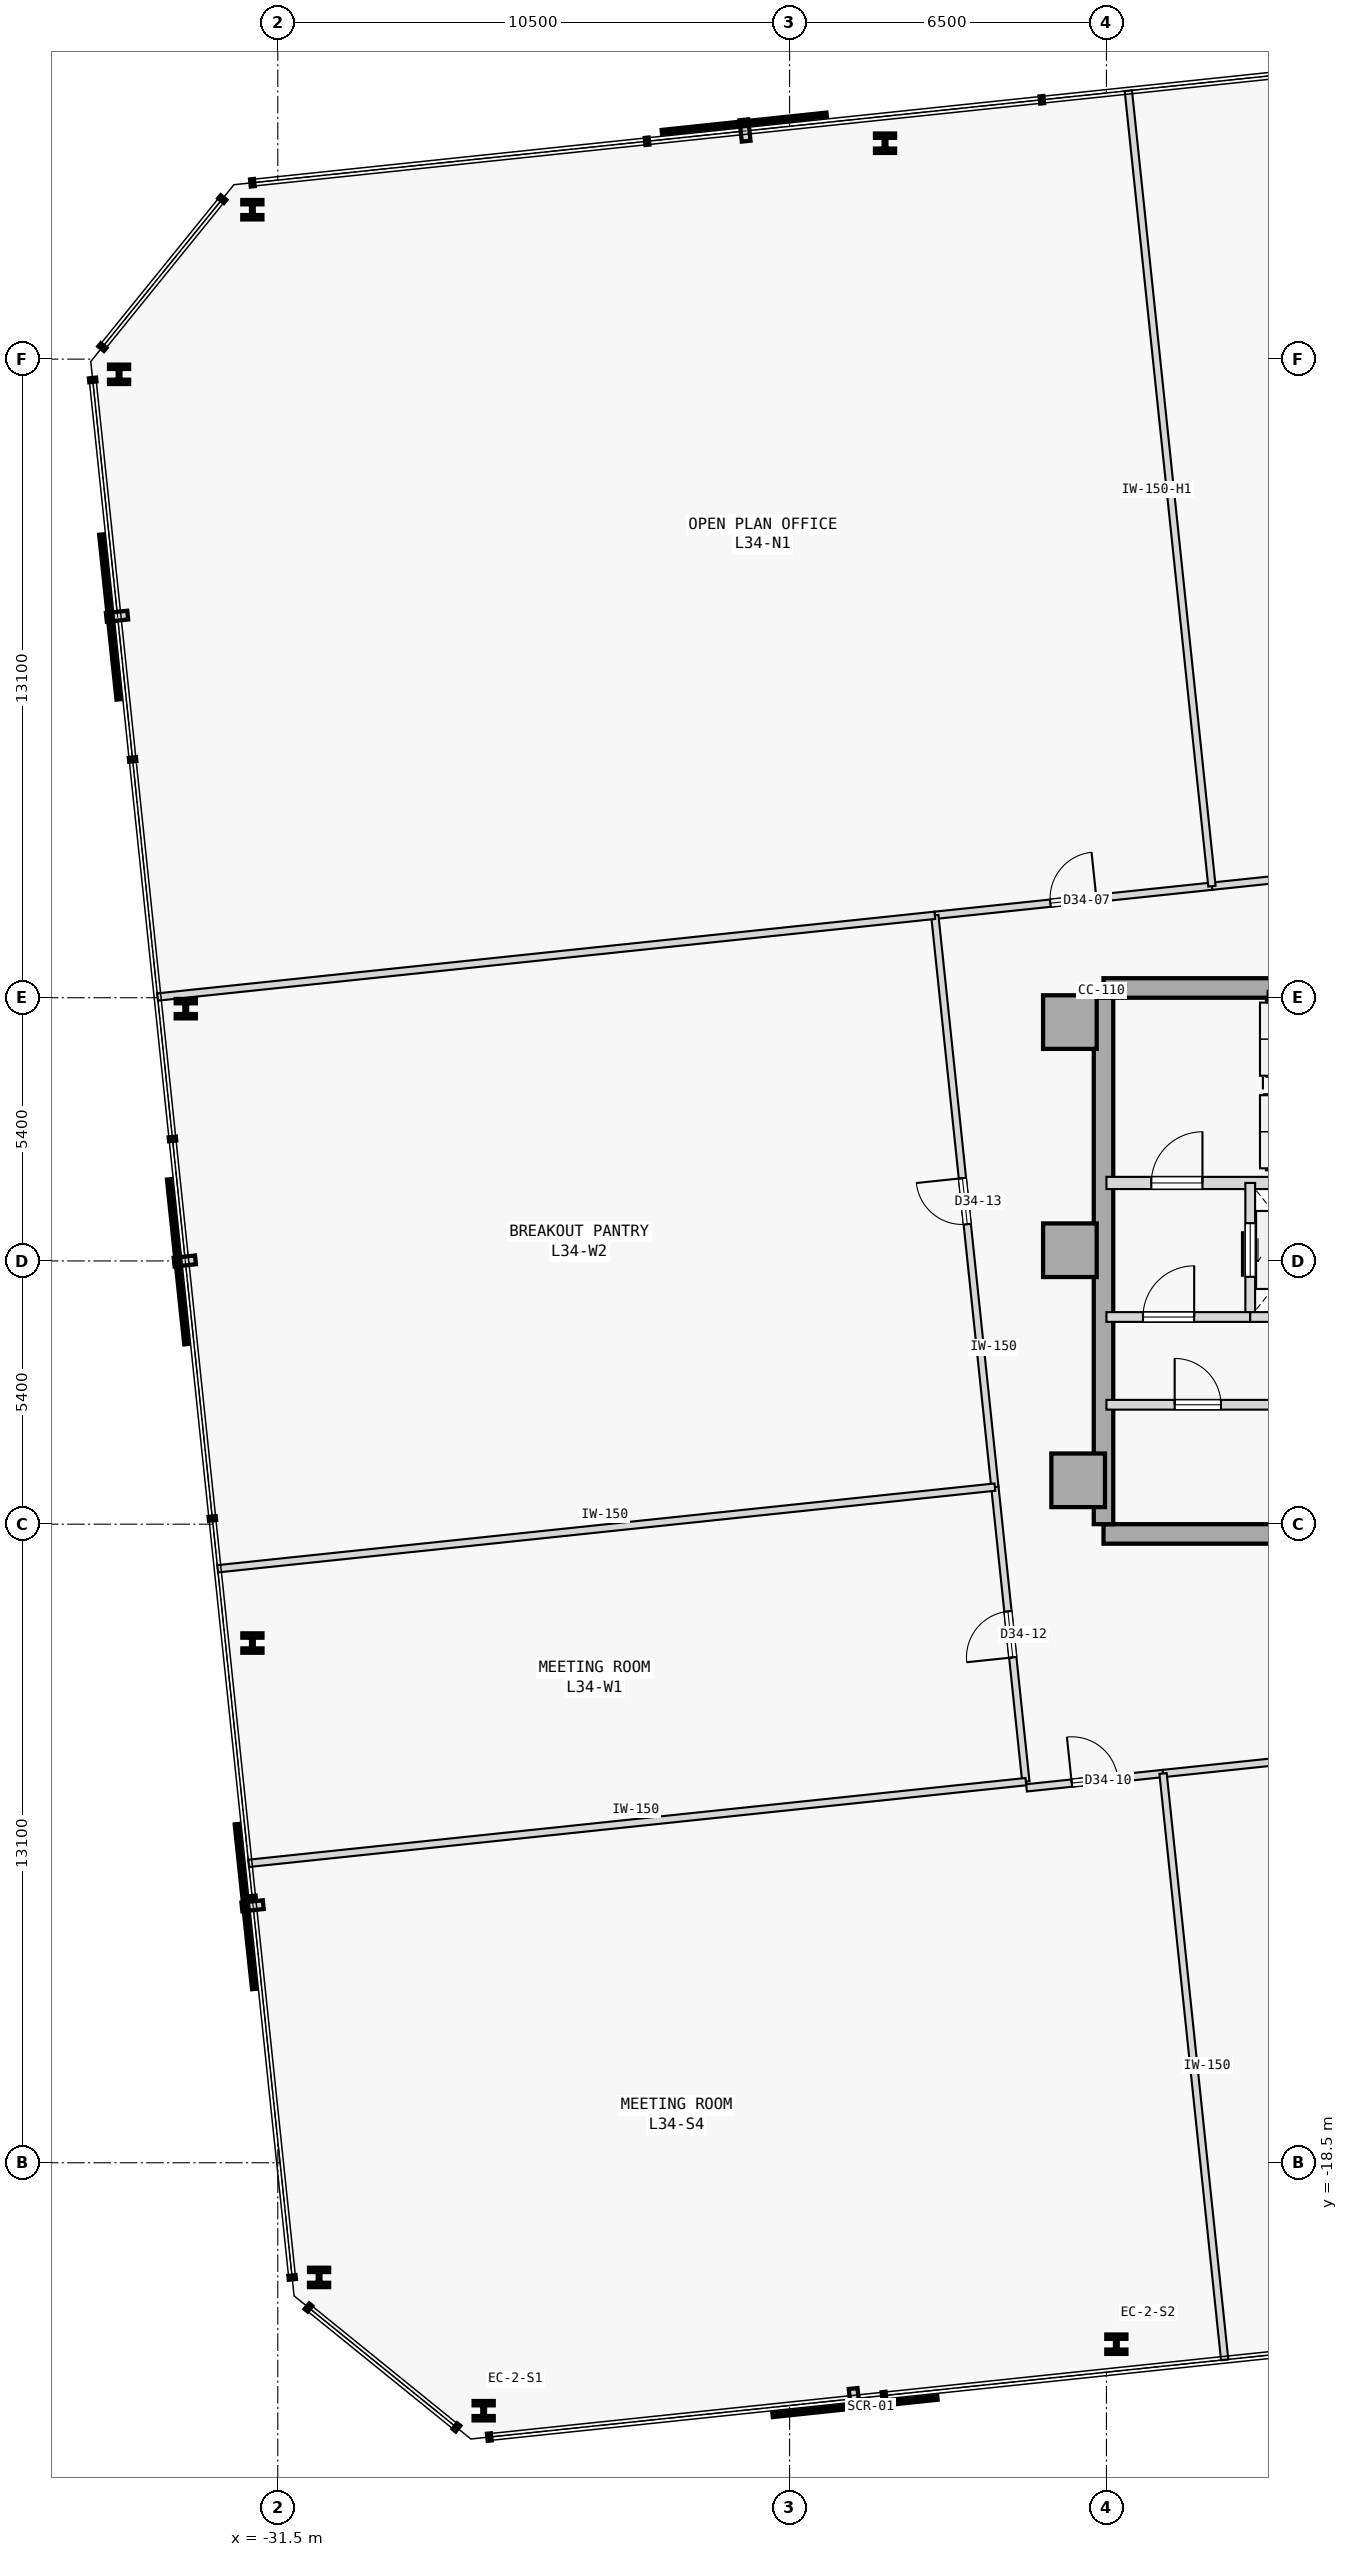
"""IFC4 building model, lengths in metres.
Left out: names, types, materials, properties, quantities, classifications, styles, units other than length and angle.
Written with IfcOpenShell. Run it as: python <this file> out.ifc"""

import sys

from ifc_helpers import new_model, si_unit, direction, frame, frame_2d, origin, origin_2d, place, context, subcontext, project, spatial, rectangle, i_section, extrude, element, fill, save


model = new_model("IFC4")
c1 = context("Model", 3, precision=1e-05, world=origin(), true_north=direction((0.0, 1.0)))
c2 = subcontext(c1, "Body", "Model", "MODEL_VIEW")
j1 = project(units=[si_unit("LENGTHUNIT", "METRE"), si_unit("PLANEANGLEUNIT", "RADIAN")], contexts=[c1])
p1 = place(None, origin())
s1 = spatial("IfcSite", under=j1, at=p1, CompositionType="ELEMENT")
p2 = place(p1, origin())
s2 = spatial("IfcBuilding", under=s1, at=p2, CompositionType="ELEMENT")
p3 = place(p2, frame((0.0, 0.0, 135.5)))
s3 = spatial("IfcBuildingStorey", under=s2, at=p3, CompositionType="ELEMENT", Elevation=135.5)
for number, where, z_axis, x_axis in (
    (1, (-15.25, 4.9, 0.0), (0.0, 0.0, 1.0), (1.0, 0.0, 0.0)),
    (2, (-15.25, 0.22, 0.0), (0.0, 0.0, 1.0), (1.0, 0.0, 0.0)),
    (3, (-15.08, -4.5, 0.0), (0.0, 0.0, 1.0), (1.0, 0.0, 0.0)),
):
    element("IfcColumn", number, at=place(p3, frame(where, z_axis=z_axis, x_axis=x_axis)), inside=s3, PredefinedType="COLUMN", context=c2, shape_type="SweptSolid", body=[
        extrude(rectangle(XDim=1.1, YDim=1.1, at=origin_2d()), origin(), (0.0, 0.0, 1.0), 3.7),
    ])
p4 = place(p3, frame((-14.56, 5.6, 0.0), z_axis=(0.0, 0.0, 1.0), x_axis=(1.0, 0.0, 0.0)))
e4 = element("IfcWall", 4, at=p4, inside=s3, PredefinedType="SHEAR", context=c2, shape_type="SweptSolid", body=[
    extrude(rectangle(XDim=11.41, YDim=0.4, at=frame_2d((5.705, 0.0))), origin(), (0.0, 0.0, 1.0), 3.475),
])
p5 = place(p3, frame((-14.56, -5.6, 0.0), z_axis=(0.0, 0.0, 1.0), x_axis=(1.0, 0.0, 0.0)))
e5 = element("IfcWall", 5, at=p5, inside=s3, PredefinedType="SHEAR", context=c2, shape_type="SweptSolid", body=[
    extrude(rectangle(XDim=10.86, YDim=0.4, at=frame_2d((5.43, 0.0))), origin(), (0.0, 0.0, 1.0), 3.475),
])
p6 = place(p3, frame((-14.56, -5.4, 0.0), z_axis=(0.0, 0.0, 1.0), x_axis=(0.0, 1.0, 0.0)))
e6 = element("IfcWall", 6, at=p6, inside=s3, PredefinedType="SHEAR", context=c2, shape_type="SweptSolid", body=[
    extrude(rectangle(XDim=10.8, YDim=0.4, at=frame_2d((5.4, 0.0))), origin(), (0.0, 0.0, 1.0), 3.475),
])
for number, where, z_axis, x_axis in (
    (7, (-27.276, -23.586, 0.0), (0.0, 0.0, 1.0), (1.0, 0.0, 0.0)),
    (8, (-14.297, -22.222, 0.0), (0.0, 0.0, 1.0), (1.0, 0.0, 0.0)),
    (9, (-19.042, 22.929, 0.0), (0.0, 0.0, 1.0), (1.0, 0.0, 0.0)),
    (10, (-32.022, 21.565, 0.0), (0.0, 0.0, 1.0), (1.0, 0.0, 0.0)),
    (11, (-34.756, 18.189, 0.0), (0.0, 0.0, 1.0), (1.0, 0.0, 0.0)),
    (12, (-33.388, 5.175, 0.0), (0.0, 0.0, 1.0), (1.0, 0.0, 0.0)),
    (13, (-32.021, -7.838, 0.0), (0.0, 0.0, 1.0), (1.0, 0.0, 0.0)),
    (14, (-30.653, -20.852, 0.0), (0.0, 0.0, 1.0), (1.0, 0.0, 0.0)),
):
    element("IfcColumn", number, at=place(p3, frame(where, z_axis=z_axis, x_axis=x_axis)), inside=s3, PredefinedType="COLUMN", context=c2, shape_type="SweptSolid", body=[
        extrude(i_section(OverallWidth=0.413, OverallDepth=0.398, WebThickness=0.056, FlangeThickness=0.089, FilletRadius=0.015, at=origin_2d()), origin(), (0.0, 0.0, 1.0), 3.7),
    ])
p7 = place(p3, frame((-14.5, 1.6, 0.0), z_axis=(0.0, 0.0, 1.0), x_axis=(1.0, 0.0, 0.0)))
e15 = element("IfcWall", 15, at=p7, inside=s3, PredefinedType="STANDARD", context=c2, shape_type="SweptSolid", body=[
    extrude(rectangle(XDim=3.6, YDim=0.25, at=frame_2d((1.8, 0.0))), origin(), (0.0, 0.0, 1.0), 3.475),
])
p8 = place(p7, frame((0.92, 0.0, 0.0)))
e16 = element("IfcOpeningElement", 16, at=p8, cuts=e15, PredefinedType="OPENING", context=c2, shape_type="SweptSolid", body=[
    extrude(rectangle(XDim=1.05, YDim=2.15, at=frame_2d((0.525, 1.075))), frame((0.0, 0.135, 0.0), z_axis=(0.0, -1.0, 0.0), x_axis=(1.0, 0.0, 0.0)), (0.0, 0.0, 1.0), 0.27),
])
p9 = place(p3, frame((-11.55, -1.15, 0.0), z_axis=(0.0, 0.0, 1.0), x_axis=(0.0, 1.0, 0.0)))
e17 = element("IfcWall", 17, at=p9, inside=s3, PredefinedType="STANDARD", context=c2, shape_type="SweptSolid", body=[
    extrude(rectangle(XDim=2.75, YDim=0.2, at=frame_2d((1.375, 0.0))), origin(), (0.0, 0.0, 1.0), 3.475),
])
p10 = place(p9, frame((0.825, 0.0, 0.0)))
e18 = element("IfcOpeningElement", 18, at=p10, cuts=e17, PredefinedType="OPENING", context=c2, shape_type="SweptSolid", body=[
    extrude(rectangle(XDim=1.1, YDim=2.15, at=frame_2d((0.55, 1.075))), frame((0.0, 0.11, 0.0), z_axis=(0.0, -1.0, 0.0), x_axis=(1.0, 0.0, 0.0)), (0.0, 0.0, 1.0), 0.22),
])
p11 = place(p3, frame((-14.5, -1.15, 0.0), z_axis=(0.0, 0.0, 1.0), x_axis=(1.0, 0.0, 0.0)))
e19 = element("IfcWall", 19, at=p11, inside=s3, PredefinedType="STANDARD", context=c2, shape_type="SweptSolid", body=[
    extrude(rectangle(XDim=2.95, YDim=0.2, at=frame_2d((1.475, 0.0))), origin(), (0.0, 0.0, 1.0), 3.475),
])
p12 = place(p11, frame((0.75, 0.0, 0.0)))
e20 = element("IfcOpeningElement", 20, at=p12, cuts=e19, PredefinedType="OPENING", context=c2, shape_type="SweptSolid", body=[
    extrude(rectangle(XDim=1.05, YDim=2.18, at=frame_2d((0.525, 1.09))), frame((0.0, 0.11, 0.0), z_axis=(0.0, -1.0, 0.0), x_axis=(1.0, 0.0, 0.0)), (0.0, 0.0, 1.0), 0.22),
])
p13 = place(p3, frame((-11.55, -1.15, 0.0), z_axis=(0.0, 0.0, 1.0), x_axis=(1.0, 0.0, 0.0)))
e21 = element("IfcWall", 21, at=p13, inside=s3, PredefinedType="STANDARD", context=c2, shape_type="SweptSolid", body=[
    extrude(rectangle(XDim=2.2, YDim=0.2, at=frame_2d((1.1, 0.0))), origin(), (0.0, 0.0, 1.0), 3.475),
])
p14 = place(p3, frame((-14.5, -2.95, 0.0), z_axis=(0.0, 0.0, 1.0), x_axis=(1.0, 0.0, 0.0)))
e22 = element("IfcWall", 22, at=p14, inside=s3, PredefinedType="STANDARD", context=c2, shape_type="SweptSolid", body=[
    extrude(rectangle(XDim=10.8, YDim=0.2, at=frame_2d((5.4, 0.0))), origin(), (0.0, 0.0, 1.0), 3.475),
])
p15 = place(p14, frame((4.85, 0.0, 0.0)))
e23 = element("IfcOpeningElement", 23, at=p15, cuts=e22, PredefinedType="OPENING", context=c2, shape_type="SweptSolid", body=[
    extrude(rectangle(XDim=1.1, YDim=2.15, at=frame_2d((0.55, 1.075))), frame((0.0, 0.11, 0.0), z_axis=(0.0, -1.0, 0.0), x_axis=(1.0, 0.0, 0.0)), (0.0, 0.0, 1.0), 0.22),
])
p16 = place(p14, frame((7.01, 0.0, 0.0)))
e24 = element("IfcOpeningElement", 24, at=p16, cuts=e22, PredefinedType="OPENING", context=c2, shape_type="SweptSolid", body=[
    extrude(rectangle(XDim=1.1, YDim=2.15, at=frame_2d((0.55, 1.075))), frame((0.0, 0.11, 0.0), z_axis=(0.0, -1.0, 0.0), x_axis=(1.0, 0.0, 0.0)), (0.0, 0.0, 1.0), 0.22),
])
p17 = place(p14, frame((1.4, 0.0, 0.0)))
e25 = element("IfcOpeningElement", 25, at=p17, cuts=e22, PredefinedType="OPENING", context=c2, shape_type="SweptSolid", body=[
    extrude(rectangle(XDim=0.95, YDim=2.15, at=frame_2d((0.475, 1.075))), frame((0.0, 0.11, 0.0), z_axis=(0.0, -1.0, 0.0), x_axis=(1.0, 0.0, 0.0)), (0.0, 0.0, 1.0), 0.22),
])
p18 = place(p3, frame((-18.021, 7.09, 0.0), z_axis=(0.0, 0.0, 1.0), x_axis=(0.994520418841, 0.104542510534, 0.0)))
e26 = element("IfcWall", 26, at=p18, inside=s3, PredefinedType="PARTITIONING", context=c2, shape_type="SweptSolid", body=[
    extrude(rectangle(XDim=5.717, YDim=0.15, at=frame_2d((2.858, 0.0))), origin(), (0.0, 0.0, 1.0), 3.475),
])
p19 = place(p18, frame((2.384, 0.0, 0.0)))
e27 = element("IfcOpeningElement", 27, at=p19, cuts=e26, PredefinedType="OPENING", context=c2, shape_type="SweptSolid", body=[
    extrude(rectangle(XDim=0.95, YDim=2.15, at=frame_2d((0.475, 1.075))), frame((0.0, 0.085, 0.0), z_axis=(0.0, -1.0, 0.0), x_axis=(1.0, 0.0, 0.0)), (0.0, 0.0, 1.0), 0.17),
])
p20 = place(p3, frame((-12.336, 7.688, 0.0), z_axis=(0.0, 0.0, 1.0), x_axis=(0.994522386381, 0.104523791488, 0.0)))
e28 = element("IfcWall", 28, at=p20, inside=s3, PredefinedType="PARTITIONING", context=c2, shape_type="SweptSolid", body=[
    extrude(rectangle(XDim=27.55, YDim=0.15, at=frame_2d((13.775, 0.0))), origin(), (0.0, 0.0, 1.0), 3.475),
])
p21 = place(p20, frame((13.3, 0.0, 0.0)))
e29 = element("IfcOpeningElement", 29, at=p21, cuts=e28, PredefinedType="OPENING", context=c2, shape_type="SweptSolid", body=[
    extrude(rectangle(XDim=0.95, YDim=2.15, at=frame_2d((0.475, 1.075))), frame((0.0, 0.085, 0.0), z_axis=(0.0, -1.0, 0.0), x_axis=(1.0, 0.0, 0.0)), (0.0, 0.0, 1.0), 0.17),
])
p22 = place(p3, frame((-16.14, -10.809, 0.0), z_axis=(0.0, 0.0, 1.0), x_axis=(0.994522535937, 0.104522368483, 0.0)))
e30 = element("IfcWall", 30, at=p22, inside=s3, PredefinedType="PARTITIONING", context=c2, shape_type="SweptSolid", body=[
    extrude(rectangle(XDim=2.817, YDim=0.15, at=frame_2d((1.408, 0.0))), origin(), (0.0, 0.0, 1.0), 3.475),
])
p23 = place(p22, frame((0.934, 0.0, 0.0)))
e31 = element("IfcOpeningElement", 31, at=p23, cuts=e30, PredefinedType="OPENING", context=c2, shape_type="SweptSolid", body=[
    extrude(rectangle(XDim=0.95, YDim=2.15, at=frame_2d((0.475, 1.075))), frame((0.0, 0.085, 0.0), z_axis=(0.0, -1.0, 0.0), x_axis=(1.0, 0.0, 0.0)), (0.0, 0.0, 1.0), 0.17),
])
p24 = place(p3, frame((-13.338, -10.515, 0.0), z_axis=(0.0, 0.0, 1.0), x_axis=(0.994522458216, 0.104523107989, 0.0)))
e32 = element("IfcWall", 32, at=p24, inside=s3, PredefinedType="PARTITIONING", context=c2, shape_type="SweptSolid", body=[
    extrude(rectangle(XDim=31.757, YDim=0.15, at=frame_2d((15.878, 0.0))), origin(), (0.0, 0.0, 1.0), 3.475),
])
p25 = place(p24, frame((15.404, 0.0, 0.0)))
e33 = element("IfcOpeningElement", 33, at=p25, cuts=e32, PredefinedType="OPENING", context=c2, shape_type="SweptSolid", body=[
    extrude(rectangle(XDim=0.95, YDim=2.15, at=frame_2d((0.475, 1.075))), frame((0.0, 0.085, 0.0), z_axis=(0.0, -1.0, 0.0), x_axis=(1.0, 0.0, 0.0)), (0.0, 0.0, 1.0), 0.17),
])
p26 = place(p3, frame((-16.153, -10.682, 0.0), z_axis=(0.0, 0.0, 1.0), x_axis=(-0.104550920346, 0.994519534778, 0.0)))
e34 = element("IfcWall", 34, at=p26, inside=s3, PredefinedType="PARTITIONING", context=c2, shape_type="SweptSolid", body=[
    extrude(rectangle(XDim=6.076, YDim=0.15, at=frame_2d((3.038, 0.0))), origin(), (0.0, 0.0, 1.0), 3.475),
])
p27 = place(p26, frame((2.563, 0.0, 0.0)))
e35 = element("IfcOpeningElement", 35, at=p27, cuts=e34, PredefinedType="OPENING", context=c2, shape_type="SweptSolid", body=[
    extrude(rectangle(XDim=0.95, YDim=2.15, at=frame_2d((0.475, 1.075))), frame((0.0, 0.085, 0.0), z_axis=(0.0, -1.0, 0.0), x_axis=(1.0, 0.0, 0.0)), (0.0, 0.0, 1.0), 0.17),
])
p28 = place(p3, frame((-16.789, -4.639, 0.0), z_axis=(0.0, 0.0, 1.0), x_axis=(-0.104515608009, 0.994523246426, 0.0)))
e36 = element("IfcWall", 36, at=p28, inside=s3, PredefinedType="PARTITIONING", context=c2, shape_type="SweptSolid", body=[
    extrude(rectangle(XDim=11.794, YDim=0.15, at=frame_2d((5.897, 0.0))), origin(), (0.0, 0.0, 1.0), 3.475),
])
p29 = place(p28, frame((5.422, 0.0, 0.0)))
e37 = element("IfcOpeningElement", 37, at=p29, cuts=e36, PredefinedType="OPENING", context=c2, shape_type="SweptSolid", body=[
    extrude(rectangle(XDim=0.95, YDim=2.15, at=frame_2d((0.475, 1.075))), frame((0.0, 0.085, 0.0), z_axis=(0.0, -1.0, 0.0), x_axis=(1.0, 0.0, 0.0)), (0.0, 0.0, 1.0), 0.17),
])
p30 = place(p3, frame((-12.336, 7.688, 0.0), z_axis=(0.0, 0.0, 1.0), x_axis=(-0.104521364336, 0.99452264147, 0.0)))
e38 = element("IfcWall", 38, at=p30, inside=s3, PredefinedType="PARTITIONING", context=c2, shape_type="SweptSolid", body=[
    extrude(rectangle(XDim=16.409, YDim=0.15, at=frame_2d((8.205, 0.0))), origin(), (0.0, 0.0, 1.0), 3.025),
])
p31 = place(p3, frame((-33.967, 5.414, 0.0), z_axis=(0.0, 0.0, 1.0), x_axis=(0.994521211213, 0.104534972363, 0.0)))
e39 = element("IfcWall", 39, at=p31, inside=s3, PredefinedType="PARTITIONING", context=c2, shape_type="SweptSolid", body=[
    extrude(rectangle(XDim=16.033, YDim=0.15, at=frame_2d((8.017, 0.0))), origin(), (0.0, 0.0, 1.0), 3.475),
])
p32 = place(p3, frame((-12.074, -22.542, 0.0), z_axis=(0.0, 0.0, 1.0), x_axis=(-0.104515587229, 0.99452324861, 0.0)))
e40 = element("IfcWall", 40, at=p32, inside=s3, PredefinedType="PARTITIONING", context=c2, shape_type="SweptSolid", body=[
    extrude(rectangle(XDim=12.093, YDim=0.15, at=frame_2d((6.046, 0.0))), origin(), (0.0, 0.0, 1.0), 3.475),
])
p33 = place(p3, frame((-32.099, -12.358, 0.0), z_axis=(0.0, 0.0, 1.0), x_axis=(0.994522794159, 0.104519911488, 0.0)))
e41 = element("IfcWall", 41, at=p33, inside=s3, PredefinedType="PARTITIONING", context=c2, shape_type="SweptSolid", body=[
    extrude(rectangle(XDim=16.033, YDim=0.15, at=frame_2d((8.017, 0.0))), origin(), (0.0, 0.0, 1.0), 3.475),
])
p34 = place(p3, frame((-32.734, -6.315, 0.0), z_axis=(0.0, 0.0, 1.0), x_axis=(0.994522627807, 0.104521494347, 0.0)))
e42 = element("IfcWall", 42, at=p34, inside=s3, PredefinedType="PARTITIONING", context=c2, shape_type="SweptSolid", body=[
    extrude(rectangle(XDim=16.033, YDim=0.15, at=frame_2d((8.017, 0.0))), origin(), (0.0, 0.0, 1.0), 3.475),
])
p35 = place(p8, origin())
e43 = element("IfcDoor", 43, at=p35, inside=s3, OperationType="SINGLE_SWING_RIGHT", PredefinedType="DOOR", context=c2, shape_type="SweptSolid", body=[
    extrude(rectangle(XDim=1.05, YDim=2.15, at=frame_2d((0.525, 1.075))), frame((0.0, 0.025, 0.0), z_axis=(0.0, -1.0, 0.0), x_axis=(1.0, 0.0, 0.0)), (0.0, 0.0, 1.0), 0.05),
])
fill(e16, e43)
p36 = place(p12, origin())
e44 = element("IfcDoor", 44, at=p36, inside=s3, OperationType="SINGLE_SWING_RIGHT", PredefinedType="DOOR", context=c2, shape_type="SweptSolid", body=[
    extrude(rectangle(XDim=1.05, YDim=2.18, at=frame_2d((0.525, 1.09))), frame((0.0, 0.025, 0.0), z_axis=(0.0, -1.0, 0.0), x_axis=(1.0, 0.0, 0.0)), (0.0, 0.0, 1.0), 0.05),
])
fill(e20, e44)
p37 = place(p10, origin())
e45 = element("IfcDoor", 45, at=p37, inside=s3, OperationType="SLIDING_TO_RIGHT", PredefinedType="DOOR", context=c2, shape_type="SweptSolid", body=[
    extrude(rectangle(XDim=1.1, YDim=2.15, at=frame_2d((0.55, 1.075))), frame((0.0, 0.025, 0.0), z_axis=(0.0, -1.0, 0.0), x_axis=(1.0, 0.0, 0.0)), (0.0, 0.0, 1.0), 0.05),
])
fill(e18, e45)
p38 = place(p17, origin())
e46 = element("IfcDoor", 46, at=p38, inside=s3, OperationType="SINGLE_SWING_LEFT", PredefinedType="DOOR", context=c2, shape_type="SweptSolid", body=[
    extrude(rectangle(XDim=0.95, YDim=2.15, at=frame_2d((0.475, 1.075))), frame((0.0, 0.025, 0.0), z_axis=(0.0, -1.0, 0.0), x_axis=(1.0, 0.0, 0.0)), (0.0, 0.0, 1.0), 0.05),
])
fill(e25, e46)
p39 = place(p19, origin())
e47 = element("IfcDoor", 47, at=p39, inside=s3, OperationType="SINGLE_SWING_RIGHT", PredefinedType="DOOR", context=c2, shape_type="SweptSolid", body=[
    extrude(rectangle(XDim=0.95, YDim=2.15, at=frame_2d((0.475, 1.075))), frame((0.0, 0.025, 0.0), z_axis=(0.0, -1.0, 0.0), x_axis=(1.0, 0.0, 0.0)), (0.0, 0.0, 1.0), 0.05),
])
fill(e27, e47)
p40 = place(p23, origin())
e48 = element("IfcDoor", 48, at=p40, inside=s3, OperationType="SINGLE_SWING_LEFT", PredefinedType="DOOR", context=c2, shape_type="SweptSolid", body=[
    extrude(rectangle(XDim=0.95, YDim=2.15, at=frame_2d((0.475, 1.075))), frame((0.0, 0.025, 0.0), z_axis=(0.0, -1.0, 0.0), x_axis=(1.0, 0.0, 0.0)), (0.0, 0.0, 1.0), 0.05),
])
fill(e31, e48)
p41 = place(p27, origin())
e49 = element("IfcDoor", 49, at=p41, inside=s3, OperationType="SINGLE_SWING_LEFT", PredefinedType="DOOR", context=c2, shape_type="SweptSolid", body=[
    extrude(rectangle(XDim=0.95, YDim=2.15, at=frame_2d((0.475, 1.075))), frame((0.0, 0.025, 0.0), z_axis=(0.0, -1.0, 0.0), x_axis=(1.0, 0.0, 0.0)), (0.0, 0.0, 1.0), 0.05),
])
fill(e35, e49)
p42 = place(p29, origin())
e50 = element("IfcDoor", 50, at=p42, inside=s3, OperationType="SINGLE_SWING_RIGHT", PredefinedType="DOOR", context=c2, shape_type="SweptSolid", body=[
    extrude(rectangle(XDim=0.95, YDim=2.15, at=frame_2d((0.475, 1.075))), frame((0.0, 0.025, 0.0), z_axis=(0.0, -1.0, 0.0), x_axis=(1.0, 0.0, 0.0)), (0.0, 0.0, 1.0), 0.05),
])
fill(e37, e50)
save(model, sys.argv[1])
